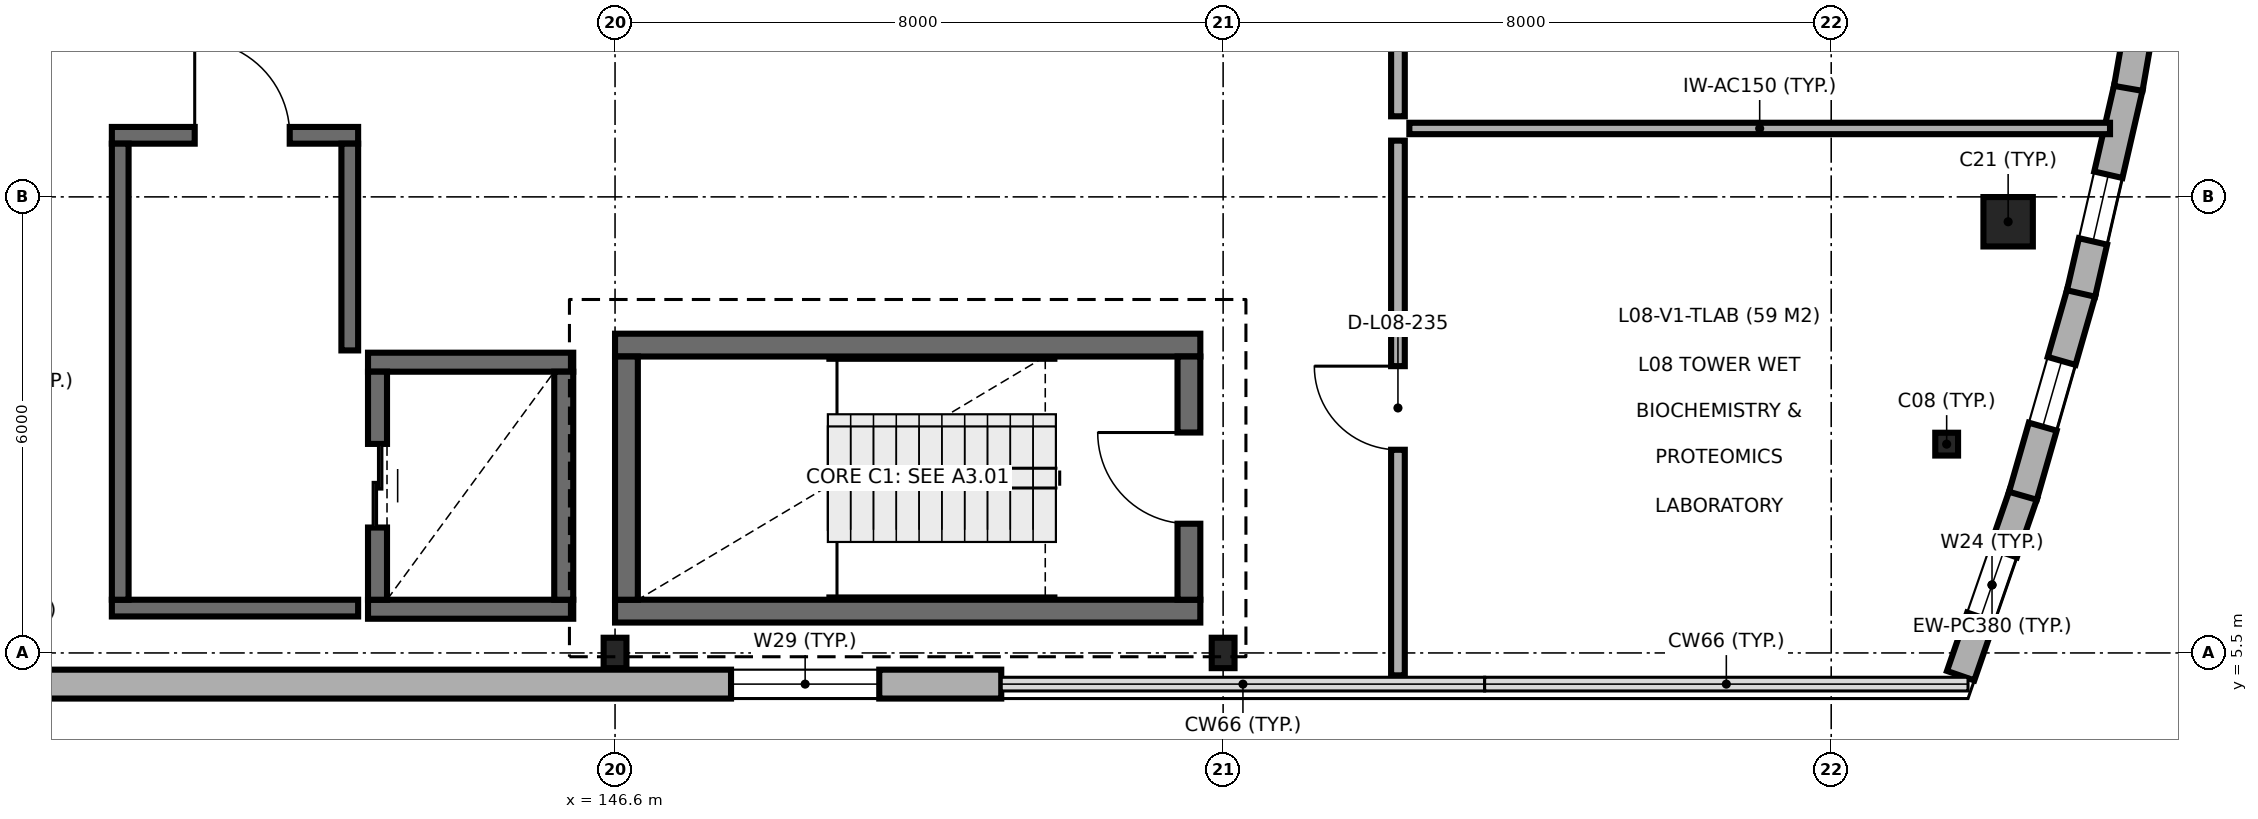
"""IFC4 building model, lengths in metres.
Left out: names, types, materials, properties, quantities, classifications, styles, units other than length and angle.
Written with IfcOpenShell. Run it as: python <this file> out.ifc"""

import sys

from ifc_helpers import new_model, si_unit, direction, frame, frame_2d, origin, origin_2d, place, context, subcontext, project, spatial, rectangle, circle, i_section, extrude, element, fill, save


model = new_model("IFC4")
c1 = context("Model", 3, precision=1e-05, world=origin(), true_north=direction((0.0, 1.0)))
c2 = subcontext(c1, "Body", "Model", "MODEL_VIEW")
j1 = project(units=[si_unit("LENGTHUNIT", "METRE"), si_unit("PLANEANGLEUNIT", "RADIAN")], contexts=[c1])
p1 = place(None, origin())
s1 = spatial("IfcSite", under=j1, at=p1, CompositionType="ELEMENT")
p2 = place(p1, origin())
s2 = spatial("IfcBuilding", under=s1, at=p2, CompositionType="ELEMENT")
p3 = place(p2, frame((0.0, 0.0, 34.5)))
s3 = spatial("IfcBuildingStorey", under=s2, at=p3, CompositionType="ELEMENT", Elevation=34.5)
for number, where, z_axis, x_axis in (
    (1, (146.6, 5.5, 0.0), (0.0, 0.0, 1.0), (1.0, 0.0, 0.0)),
    (2, (154.6, 5.5, 0.0), (0.0, 0.0, 1.0), (1.0, 0.0, 0.0)),
):
    element("IfcColumn", number, at=place(p3, frame(where, z_axis=z_axis, x_axis=x_axis)), inside=s3, PredefinedType="COLUMN", context=c2, shape_type="SweptSolid", body=[
        extrude(i_section(OverallWidth=0.3, OverallDepth=0.4, WebThickness=0.013, FlangeThickness=0.024, FilletRadius=0.027, at=origin_2d()), origin(), (0.0, 0.0, 1.0), 3.9),
    ])
p4 = place(p3, frame((164.119, 8.247, 0.0), z_axis=(0.0, 0.0, 1.0), x_axis=(1.0, 0.0, 0.0)))
e3 = element("IfcColumn", 3, at=p4, inside=s3, PredefinedType="COLUMN", context=c2, shape_type="SweptSolid", body=[
    extrude(i_section(OverallWidth=0.3, OverallDepth=0.3, WebThickness=0.011, FlangeThickness=0.019, FilletRadius=0.027, at=origin_2d()), origin(), (0.0, 0.0, 1.0), 3.9),
])
p5 = place(p3, frame((164.928, 11.173, 0.0), z_axis=(0.0, 0.0, 1.0), x_axis=(1.0, 0.0, 0.0)))
e4 = element("IfcColumn", 4, at=p5, inside=s3, PredefinedType="COLUMN", context=c2, shape_type="SweptSolid", body=[
    extrude(circle(Radius=0.325, at=origin_2d()), origin(), (0.0, 0.0, 1.0), 3.9),
])
for number, where, z_axis, x_axis in (
    (5, (146.6, 6.05, 0.0), (0.0, 0.0, 1.0), (1.0, 0.0, 0.0)),
    (6, (154.3, 9.55, 0.0), (0.0, 0.0, 1.0), (-1.0, 0.0, 0.0)),
):
    element("IfcWall", number, at=place(p3, frame(where, z_axis=z_axis, x_axis=x_axis)), inside=s3, PredefinedType="SHEAR", context=c2, shape_type="SweptSolid", body=[
        extrude(rectangle(XDim=7.7, YDim=0.3, at=frame_2d((3.85, 0.0))), origin(), (0.0, 0.0, 1.0), 3.9),
    ])
p6 = place(p3, frame((146.75, 9.4, 0.0), z_axis=(0.0, 0.0, 1.0), x_axis=(0.0, -1.0, 0.0)))
e7 = element("IfcWall", 7, at=p6, inside=s3, PredefinedType="SHEAR", context=c2, shape_type="SweptSolid", body=[
    extrude(rectangle(XDim=3.2, YDim=0.3, at=frame_2d((1.6, 0.0))), origin(), (0.0, 0.0, 1.0), 3.9),
])
p7 = place(p3, frame((154.15, 6.2, 0.0), z_axis=(0.0, 0.0, 1.0), x_axis=(0.0, 1.0, 0.0)))
e8 = element("IfcWall", 8, at=p7, inside=s3, PredefinedType="SHEAR", context=c2, shape_type="SweptSolid", body=[
    extrude(rectangle(XDim=3.2, YDim=0.3, at=frame_2d((1.6, 0.0))), origin(), (0.0, 0.0, 1.0), 3.9),
])
p8 = place(p7, frame((1.0, 0.0, 0.0)))
e9 = element("IfcOpeningElement", 9, at=p8, cuts=e8, PredefinedType="OPENING", context=c2, shape_type="SweptSolid", body=[
    extrude(rectangle(XDim=1.2, YDim=2.15, at=frame_2d((0.6, 1.075))), frame((0.0, 0.16, 0.0), z_axis=(0.0, -1.0, 0.0), x_axis=(1.0, 0.0, 0.0)), (0.0, 0.0, 1.0), 0.32),
])
for number, where, z_axis, x_axis in (
    (10, (143.35, 6.075, 0.0), (0.0, 0.0, 1.0), (1.0, 0.0, 0.0)),
    (11, (146.05, 9.325, 0.0), (0.0, 0.0, 1.0), (-1.0, 0.0, 0.0)),
):
    element("IfcWall", number, at=place(p3, frame(where, z_axis=z_axis, x_axis=x_axis)), inside=s3, PredefinedType="SHEAR", context=c2, shape_type="SweptSolid", body=[
        extrude(rectangle(XDim=2.7, YDim=0.25, at=frame_2d((1.35, 0.0))), origin(), (0.0, 0.0, 1.0), 3.9),
    ])
p9 = place(p3, frame((143.475, 9.2, 0.0), z_axis=(0.0, 0.0, 1.0), x_axis=(0.0, -1.0, 0.0)))
e12 = element("IfcWall", 12, at=p9, inside=s3, PredefinedType="SHEAR", context=c2, shape_type="SweptSolid", body=[
    extrude(rectangle(XDim=3.0, YDim=0.25, at=frame_2d((1.5, 0.0))), origin(), (0.0, 0.0, 1.0), 3.9),
])
p10 = place(p9, frame((0.95, 0.0, 0.0)))
e13 = element("IfcOpeningElement", 13, at=p10, cuts=e12, PredefinedType="OPENING", context=c2, shape_type="SweptSolid", body=[
    extrude(rectangle(XDim=1.1, YDim=2.15, at=frame_2d((0.55, 1.075))), frame((0.0, 0.135, 0.0), z_axis=(0.0, -1.0, 0.0), x_axis=(1.0, 0.0, 0.0)), (0.0, 0.0, 1.0), 0.27),
])
p11 = place(p3, frame((145.925, 6.2, 0.0), z_axis=(0.0, 0.0, 1.0), x_axis=(0.0, 1.0, 0.0)))
e14 = element("IfcWall", 14, at=p11, inside=s3, PredefinedType="SHEAR", context=c2, shape_type="SweptSolid", body=[
    extrude(rectangle(XDim=3.0, YDim=0.25, at=frame_2d((1.5, 0.0))), origin(), (0.0, 0.0, 1.0), 3.9),
])
p12 = place(p3, frame((139.98, 6.09, 0.0), z_axis=(0.0, 0.0, 1.0), x_axis=(1.0, 0.0, 0.0)))
e15 = element("IfcWall", 15, at=p12, inside=s3, PredefinedType="SOLIDWALL", context=c2, shape_type="SweptSolid", body=[
    extrude(rectangle(XDim=3.24, YDim=0.22, at=frame_2d((1.62, 0.0))), origin(), (0.0, 0.0, 1.0), 3.7),
])
p13 = place(p3, frame((143.22, 12.31, 0.0), z_axis=(0.0, 0.0, 1.0), x_axis=(-1.0, 0.0, 0.0)))
e16 = element("IfcWall", 16, at=p13, inside=s3, PredefinedType="SOLIDWALL", context=c2, shape_type="SweptSolid", body=[
    extrude(rectangle(XDim=3.24, YDim=0.22, at=frame_2d((1.62, 0.0))), origin(), (0.0, 0.0, 1.0), 3.7),
])
p14 = place(p13, frame((0.9, 0.0, 0.0)))
e17 = element("IfcOpeningElement", 17, at=p14, cuts=e16, PredefinedType="OPENING", context=c2, shape_type="SweptSolid", body=[
    extrude(rectangle(XDim=1.25, YDim=2.15, at=frame_2d((0.625, 1.075))), frame((0.0, 0.12, 0.0), z_axis=(0.0, -1.0, 0.0), x_axis=(1.0, 0.0, 0.0)), (0.0, 0.0, 1.0), 0.24),
])
p15 = place(p3, frame((140.09, 12.2, 0.0), z_axis=(0.0, 0.0, 1.0), x_axis=(0.0, -1.0, 0.0)))
e18 = element("IfcWall", 18, at=p15, inside=s3, PredefinedType="SOLIDWALL", context=c2, shape_type="SweptSolid", body=[
    extrude(rectangle(XDim=6.0, YDim=0.22, at=frame_2d((3.0, 0.0))), origin(), (0.0, 0.0, 1.0), 3.7),
])
p16 = place(p3, frame((143.11, 9.48, 0.0), z_axis=(0.0, 0.0, 1.0), x_axis=(0.0, 1.0, 0.0)))
e19 = element("IfcWall", 19, at=p16, inside=s3, PredefinedType="SOLIDWALL", context=c2, shape_type="SweptSolid", body=[
    extrude(rectangle(XDim=2.72, YDim=0.22, at=frame_2d((1.36, 0.0))), origin(), (0.0, 0.0, 1.0), 3.7),
])
p17 = place(p3, frame((138.962, 5.09, 0.0), z_axis=(0.0, 0.0, 1.0), x_axis=(1.0, 0.0, 0.0)))
e20 = element("IfcWall", 20, at=p17, inside=s3, PredefinedType="SOLIDWALL", context=c2, shape_type="SweptSolid", body=[
    extrude(rectangle(XDim=12.719, YDim=0.38, at=frame_2d((6.359, 0.0))), origin(), (0.0, 0.0, 1.0), 3.7),
])
p18 = place(p17, frame((9.164, 0.0, 0.9)))
e21 = element("IfcOpeningElement", 21, at=p18, cuts=e20, PredefinedType="OPENING", context=c2, shape_type="SweptSolid", body=[
    extrude(rectangle(XDim=1.95, YDim=1.95, at=frame_2d((0.975, 0.975))), frame((0.0, 0.2, 0.0), z_axis=(0.0, -1.0, 0.0), x_axis=(1.0, 0.0, 0.0)), (0.0, 0.0, 1.0), 0.4),
])
p19 = place(p3, frame((164.303, 5.201, 0.0), z_axis=(0.0, 0.0, 1.0), x_axis=(0.3268184741, 0.945087130897, 0.0)))
e22 = element("IfcWall", 22, at=p19, inside=s3, PredefinedType="SOLIDWALL", context=c2, shape_type="SweptSolid", body=[
    extrude(rectangle(XDim=2.526, YDim=0.38, at=frame_2d((1.263, 0.0))), origin(), (0.0, 0.0, 1.0), 3.7),
])
p20 = place(p19, frame((0.813, 0.0, 0.9)))
e23 = element("IfcOpeningElement", 23, at=p20, cuts=e22, PredefinedType="OPENING", context=c2, shape_type="SweptSolid", body=[
    extrude(rectangle(XDim=0.9, YDim=1.8, at=frame_2d((0.45, 0.9))), frame((0.0, 0.2, 0.0), z_axis=(0.0, -1.0, 0.0), x_axis=(1.0, 0.0, 0.0)), (0.0, 0.0, 1.0), 0.4),
])
p21 = place(p3, frame((165.122, 7.567, 0.0), z_axis=(0.0, 0.0, 1.0), x_axis=(0.275772175055, 0.961223026912, 0.0)))
e24 = element("IfcWall", 24, at=p21, inside=s3, PredefinedType="SOLIDWALL", context=c2, shape_type="SweptSolid", body=[
    extrude(rectangle(XDim=2.791, YDim=0.38, at=frame_2d((1.396, 0.0))), origin(), (0.0, 0.0, 1.0), 3.7),
])
p22 = place(p21, frame((0.946, 0.0, 0.9)))
e25 = element("IfcOpeningElement", 25, at=p22, cuts=e24, PredefinedType="OPENING", context=c2, shape_type="SweptSolid", body=[
    extrude(rectangle(XDim=0.9, YDim=1.8, at=frame_2d((0.45, 0.9))), frame((0.0, 0.2, 0.0), z_axis=(0.0, -1.0, 0.0), x_axis=(1.0, 0.0, 0.0)), (0.0, 0.0, 1.0), 0.4),
])
p23 = place(p3, frame((165.887, 10.229, 0.0), z_axis=(0.0, 0.0, 1.0), x_axis=(0.224009786197, 0.974586894888, 0.0)))
e26 = element("IfcWall", 26, at=p23, inside=s3, PredefinedType="SOLIDWALL", context=c2, shape_type="SweptSolid", body=[
    extrude(rectangle(XDim=2.791, YDim=0.38, at=frame_2d((1.396, 0.0))), origin(), (0.0, 0.0, 1.0), 3.7),
])
p24 = place(p23, frame((0.703, 0.0, 0.9)))
e27 = element("IfcOpeningElement", 27, at=p24, cuts=e26, PredefinedType="OPENING", context=c2, shape_type="SweptSolid", body=[
    extrude(rectangle(XDim=0.9, YDim=1.8, at=frame_2d((0.45, 0.9))), frame((0.0, 0.2, 0.0), z_axis=(0.0, -1.0, 0.0), x_axis=(1.0, 0.0, 0.0)), (0.0, 0.0, 1.0), 0.4),
])
p25 = place(p3, frame((166.508, 12.927, 0.0), z_axis=(0.0, 0.0, 1.0), x_axis=(0.171699219546, 0.985149419128, 0.0)))
e28 = element("IfcWall", 28, at=p25, inside=s3, PredefinedType="SOLIDWALL", context=c2, shape_type="SweptSolid", body=[
    extrude(rectangle(XDim=2.791, YDim=0.38, at=frame_2d((1.396, 0.0))), origin(), (0.0, 0.0, 1.0), 3.7),
])
p26 = place(p25, frame((0.701, 0.0, 0.9)))
e29 = element("IfcOpeningElement", 29, at=p26, cuts=e28, PredefinedType="OPENING", context=c2, shape_type="SweptSolid", body=[
    extrude(rectangle(XDim=0.9, YDim=1.8, at=frame_2d((0.45, 0.9))), frame((0.0, 0.2, 0.0), z_axis=(0.0, -1.0, 0.0), x_axis=(1.0, 0.0, 0.0)), (0.0, 0.0, 1.0), 0.4),
])
p27 = place(p3, frame((157.05, 12.4, 0.0), z_axis=(0.0, 0.0, 1.0), x_axis=(1.0, 0.0, 0.0)))
e30 = element("IfcWall", 30, at=p27, inside=s3, PredefinedType="PARTITIONING", context=c2, shape_type="SweptSolid", body=[
    extrude(rectangle(XDim=9.218, YDim=0.15, at=frame_2d((4.609, 0.0))), origin(), (0.0, 0.0, 1.0), 3.7),
])
p28 = place(p3, frame((156.9, 5.205, 0.0), z_axis=(0.0, 0.0, 1.0), x_axis=(0.0, 1.0, 0.0)))
e31 = element("IfcWall", 31, at=p28, inside=s3, PredefinedType="PARTITIONING", context=c2, shape_type="SweptSolid", body=[
    extrude(rectangle(XDim=7.035, YDim=0.18, at=frame_2d((3.518, 0.0))), origin(), (0.0, 0.0, 1.0), 3.7),
])
p29 = place(p28, frame((2.968, 0.0, 0.0)))
e32 = element("IfcOpeningElement", 32, at=p29, cuts=e31, PredefinedType="OPENING", context=c2, shape_type="SweptSolid", body=[
    extrude(rectangle(XDim=1.1, YDim=2.15, at=frame_2d((0.55, 1.075))), frame((0.0, 0.1, 0.0), z_axis=(0.0, -1.0, 0.0), x_axis=(1.0, 0.0, 0.0)), (0.0, 0.0, 1.0), 0.2),
])
p30 = place(p3, frame((156.9, 12.56, 0.0), z_axis=(0.0, 0.0, 1.0), x_axis=(0.0, 1.0, 0.0)))
e33 = element("IfcWall", 33, at=p30, inside=s3, PredefinedType="PARTITIONING", context=c2, shape_type="SweptSolid", body=[
    extrude(rectangle(XDim=9.08, YDim=0.18, at=frame_2d((4.54, 0.0))), origin(), (0.0, 0.0, 1.0), 3.7),
])
p31 = place(p30, frame((4.04, 0.0, 0.0)))
e34 = element("IfcOpeningElement", 34, at=p31, cuts=e33, PredefinedType="OPENING", context=c2, shape_type="SweptSolid", body=[
    extrude(rectangle(XDim=1.0, YDim=2.15, at=frame_2d((0.5, 1.075))), frame((0.0, 0.1, 0.0), z_axis=(0.0, -1.0, 0.0), x_axis=(1.0, 0.0, 0.0)), (0.0, 0.0, 1.0), 0.2),
])
p32 = place(p8, origin())
e35 = element("IfcDoor", 35, at=p32, inside=s3, OperationType="SINGLE_SWING_RIGHT", PredefinedType="DOOR", context=c2, shape_type="SweptSolid", body=[
    extrude(rectangle(XDim=1.2, YDim=2.15, at=frame_2d((0.6, 1.075))), frame((0.0, 0.025, 0.0), z_axis=(0.0, -1.0, 0.0), x_axis=(1.0, 0.0, 0.0)), (0.0, 0.0, 1.0), 0.05),
])
fill(e9, e35)
p33 = place(p10, origin())
e36 = element("IfcDoor", 36, at=p33, inside=s3, OperationType="DOUBLE_DOOR_SLIDING", PredefinedType="DOOR", context=c2, shape_type="SweptSolid", body=[
    extrude(rectangle(XDim=1.1, YDim=2.15, at=frame_2d((0.55, 1.075))), frame((0.0, 0.025, 0.0), z_axis=(0.0, -1.0, 0.0), x_axis=(1.0, 0.0, 0.0)), (0.0, 0.0, 1.0), 0.05),
])
fill(e13, e36)
p34 = place(p14, frame((1.25, 0.0, 0.0), z_axis=(0.0, 0.0, 1.0), x_axis=(-1.0, 0.0, 0.0)))
e37 = element("IfcDoor", 37, at=p34, inside=s3, OperationType="SINGLE_SWING_RIGHT", PredefinedType="DOOR", context=c2, shape_type="SweptSolid", body=[
    extrude(rectangle(XDim=1.25, YDim=2.15, at=frame_2d((0.625, 1.075))), frame((0.0, 0.025, 0.0), z_axis=(0.0, -1.0, 0.0), x_axis=(1.0, 0.0, 0.0)), (0.0, 0.0, 1.0), 0.05),
])
fill(e17, e37)
p35 = place(p18, origin())
e38 = element("IfcWindow", 38, at=p35, inside=s3, PartitioningType="SINGLE_PANEL", PredefinedType="WINDOW", context=c2, shape_type="SweptSolid", body=[
    extrude(rectangle(XDim=1.95, YDim=1.95, at=frame_2d((0.975, 0.975))), frame((0.0, 0.03, 0.0), z_axis=(0.0, -1.0, 0.0), x_axis=(1.0, 0.0, 0.0)), (0.0, 0.0, 1.0), 0.06),
])
fill(e21, e38)
p36 = place(p20, origin())
e39 = element("IfcWindow", 39, at=p36, inside=s3, PartitioningType="SINGLE_PANEL", PredefinedType="WINDOW", context=c2, shape_type="SweptSolid", body=[
    extrude(rectangle(XDim=0.9, YDim=1.8, at=frame_2d((0.45, 0.9))), frame((0.0, 0.03, 0.0), z_axis=(0.0, -1.0, 0.0), x_axis=(1.0, 0.0, 0.0)), (0.0, 0.0, 1.0), 0.06),
])
fill(e23, e39)
p37 = place(p22, origin())
e40 = element("IfcWindow", 40, at=p37, inside=s3, PartitioningType="SINGLE_PANEL", PredefinedType="WINDOW", context=c2, shape_type="SweptSolid", body=[
    extrude(rectangle(XDim=0.9, YDim=1.8, at=frame_2d((0.45, 0.9))), frame((0.0, 0.03, 0.0), z_axis=(0.0, -1.0, 0.0), x_axis=(1.0, 0.0, 0.0)), (0.0, 0.0, 1.0), 0.06),
])
fill(e25, e40)
p38 = place(p24, origin())
e41 = element("IfcWindow", 41, at=p38, inside=s3, PartitioningType="SINGLE_PANEL", PredefinedType="WINDOW", context=c2, shape_type="SweptSolid", body=[
    extrude(rectangle(XDim=0.9, YDim=1.8, at=frame_2d((0.45, 0.9))), frame((0.0, 0.03, 0.0), z_axis=(0.0, -1.0, 0.0), x_axis=(1.0, 0.0, 0.0)), (0.0, 0.0, 1.0), 0.06),
])
fill(e27, e41)
p39 = place(p29, origin())
e42 = element("IfcDoor", 42, at=p39, inside=s3, OperationType="SINGLE_SWING_RIGHT", PredefinedType="DOOR", context=c2, shape_type="SweptSolid", body=[
    extrude(rectangle(XDim=1.1, YDim=2.15, at=frame_2d((0.55, 1.075))), frame((0.0, 0.025, 0.0), z_axis=(0.0, -1.0, 0.0), x_axis=(1.0, 0.0, 0.0)), (0.0, 0.0, 1.0), 0.05),
])
fill(e32, e42)
save(model, sys.argv[1])
